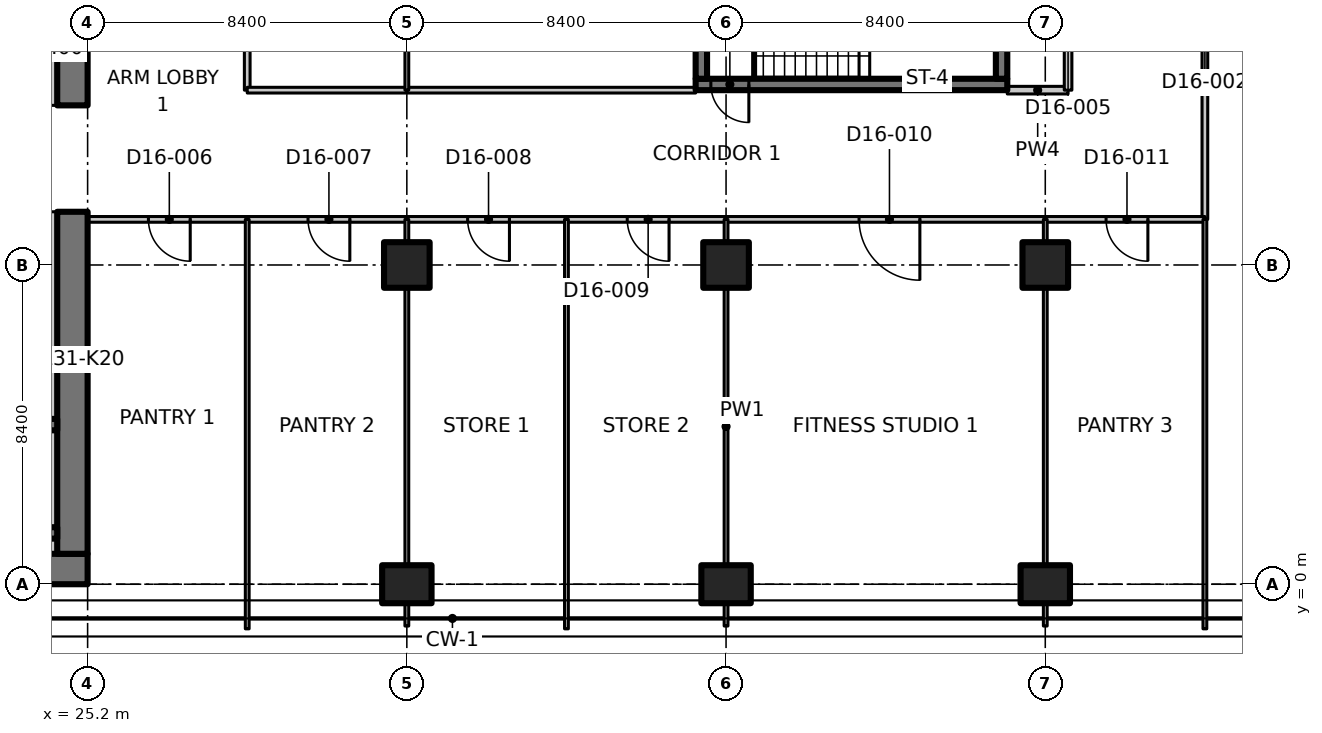
"""IFC4 building model, lengths in metres.
Left out: names, types, materials, properties, quantities, classifications, styles, units other than length and angle.
Written with IfcOpenShell. Run it as: python <this file> out.ifc"""

import sys

from ifc_helpers import new_model, si_unit, direction, frame, frame_2d, origin, origin_2d, place, context, subcontext, project, spatial, polyline, rectangle, outline, extrude, element, fill, save


model = new_model("IFC4")
c1 = context("Model", 3, precision=1e-05, world=origin(), true_north=direction((0.0, 1.0)))
c2 = subcontext(c1, "Body", "Model", "MODEL_VIEW")
j1 = project(units=[si_unit("LENGTHUNIT", "METRE"), si_unit("PLANEANGLEUNIT", "RADIAN")], contexts=[c1])
p1 = place(None, origin())
s1 = spatial("IfcSite", under=j1, at=p1, CompositionType="ELEMENT")
p2 = place(p1, origin())
s2 = spatial("IfcBuilding", under=s1, at=p2, CompositionType="ELEMENT")
p3 = place(p2, frame((0.0, 0.0, 127.7)))
s3 = spatial("IfcBuildingStorey", under=s2, at=p3, CompositionType="ELEMENT", Elevation=127.7)
p4 = place(p3, frame((33.6, 0.0, 0.0), z_axis=(0.0, 0.0, 1.0), x_axis=(0.0, 1.0, 0.0)))
e1 = element("IfcColumn", 1, at=p4, inside=s3, PredefinedType="COLUMN", context=c2, shape_type="SweptSolid", body=[
    extrude(rectangle(XDim=1.0, YDim=1.3, at=origin_2d()), origin(), (0.0, 0.0, 1.0), 3.35),
])
p5 = place(p3, frame((33.6, 8.4, 0.0), z_axis=(0.0, 0.0, 1.0), x_axis=(1.0, 0.0, 0.0)))
e2 = element("IfcColumn", 2, at=p5, inside=s3, PredefinedType="COLUMN", context=c2, shape_type="SweptSolid", body=[
    extrude(rectangle(XDim=1.2, YDim=1.2, at=origin_2d()), origin(), (0.0, 0.0, 1.0), 3.35),
])
p6 = place(p3, frame((42.0, 0.0, 0.0), z_axis=(0.0, 0.0, 1.0), x_axis=(0.0, 1.0, 0.0)))
e3 = element("IfcColumn", 3, at=p6, inside=s3, PredefinedType="COLUMN", context=c2, shape_type="SweptSolid", body=[
    extrude(rectangle(XDim=1.0, YDim=1.3, at=origin_2d()), origin(), (0.0, 0.0, 1.0), 3.35),
])
p7 = place(p3, frame((42.0, 8.4, 0.0), z_axis=(0.0, 0.0, 1.0), x_axis=(1.0, 0.0, 0.0)))
e4 = element("IfcColumn", 4, at=p7, inside=s3, PredefinedType="COLUMN", context=c2, shape_type="SweptSolid", body=[
    extrude(rectangle(XDim=1.2, YDim=1.2, at=origin_2d()), origin(), (0.0, 0.0, 1.0), 3.35),
])
p8 = place(p3, frame((50.4, 0.0, 0.0), z_axis=(0.0, 0.0, 1.0), x_axis=(0.0, 1.0, 0.0)))
e5 = element("IfcColumn", 5, at=p8, inside=s3, PredefinedType="COLUMN", context=c2, shape_type="SweptSolid", body=[
    extrude(rectangle(XDim=1.0, YDim=1.3, at=origin_2d()), origin(), (0.0, 0.0, 1.0), 3.35),
])
p9 = place(p3, frame((50.4, 8.4, 0.0), z_axis=(0.0, 0.0, 1.0), x_axis=(1.0, 0.0, 0.0)))
e6 = element("IfcColumn", 6, at=p9, inside=s3, PredefinedType="COLUMN", context=c2, shape_type="SweptSolid", body=[
    extrude(rectangle(XDim=1.2, YDim=1.2, at=origin_2d()), origin(), (0.0, 0.0, 1.0), 3.35),
])
p10 = place(p3, frame((7.136, 0.4, 0.0), z_axis=(0.0, 0.0, 1.0), x_axis=(1.0, 0.0, 0.0)))
e7 = element("IfcWall", 7, at=p10, inside=s3, PredefinedType="SHEAR", context=c2, shape_type="SweptSolid", body=[
    extrude(rectangle(XDim=18.063, YDim=0.8, at=frame_2d((9.032, 0.0))), origin(), (0.0, 0.0, 1.0), 3.35),
])
p11 = place(p3, frame((24.8, 0.8, 0.0), z_axis=(0.0, 0.0, 1.0), x_axis=(0.0, 1.0, 0.0)))
e8 = element("IfcWall", 8, at=p11, inside=s3, PredefinedType="SHEAR", context=c2, shape_type="SweptSolid", body=[
    extrude(rectangle(XDim=9.0, YDim=0.8, at=frame_2d((4.5, 0.0))), origin(), (0.0, 0.0, 1.0), 3.35),
])
p12 = place(p3, frame((24.8, 12.6, 0.0), z_axis=(0.0, 0.0, 1.0), x_axis=(0.0, 1.0, 0.0)))
e9 = element("IfcWall", 9, at=p12, inside=s3, PredefinedType="SHEAR", context=c2, shape_type="SweptSolid", body=[
    extrude(rectangle(XDim=3.4, YDim=0.8, at=frame_2d((1.7, 0.0))), origin(), (0.0, 0.0, 1.0), 3.35),
])
p13 = place(p3, frame((24.2, 12.6, 0.0), z_axis=(0.0, 0.0, 1.0), x_axis=(0.0, 1.0, 0.0)))
e10 = element("IfcWall", 10, at=p13, inside=s3, PredefinedType="PARTITIONING", context=c2, shape_type="SweptSolid", body=[
    extrude(rectangle(XDim=3.0, YDim=0.4, at=frame_2d((1.5, 0.0))), origin(), (0.0, 0.0, 1.0), 3.35),
])
p14 = place(p3, frame((15.8, 1.35, 0.0), z_axis=(0.0, 0.0, 1.0), x_axis=(1.0, 0.0, 0.0)))
e11 = element("IfcWall", 11, at=p14, inside=s3, PredefinedType="SHEAR", context=c2, shape_type="SweptSolid", body=[
    extrude(rectangle(XDim=8.6, YDim=0.3, at=frame_2d((4.3, 0.0))), origin(), (0.0, 0.0, 1.0), 3.35),
])
p15 = place(p3, frame((15.8, 4.2, 0.0), z_axis=(0.0, 0.0, 1.0), x_axis=(1.0, 0.0, 0.0)))
e12 = element("IfcWall", 12, at=p15, inside=s3, PredefinedType="SHEAR", context=c2, shape_type="SweptSolid", body=[
    extrude(rectangle(XDim=8.6, YDim=0.3, at=frame_2d((4.3, 0.0))), origin(), (0.0, 0.0, 1.0), 3.35),
])
p16 = place(p15, frame((0.4, 0.0, 0.0)))
e13 = element("IfcOpeningElement", 13, at=p16, cuts=e12, PredefinedType="OPENING", context=c2, shape_type="SweptSolid", body=[
    extrude(rectangle(XDim=1.0, YDim=2.1, at=frame_2d((0.5, 1.05))), frame((0.0, 0.16, 0.0), z_axis=(0.0, -1.0, 0.0), x_axis=(1.0, 0.0, 0.0)), (0.0, 0.0, 1.0), 0.32),
])
p17 = place(p3, frame((49.4, 13.15, 0.0), z_axis=(0.0, 0.0, 1.0), x_axis=(-1.0, 0.0, 0.0)))
e14 = element("IfcWall", 14, at=p17, inside=s3, PredefinedType="SHEAR", context=c2, shape_type="SweptSolid", body=[
    extrude(rectangle(XDim=8.2, YDim=0.3, at=frame_2d((4.1, 0.0))), origin(), (0.0, 0.0, 1.0), 3.35),
])
p18 = place(p17, frame((6.8, 0.0, 0.0)))
e15 = element("IfcOpeningElement", 15, at=p18, cuts=e14, PredefinedType="OPENING", context=c2, shape_type="SweptSolid", body=[
    extrude(rectangle(XDim=1.0, YDim=2.1, at=frame_2d((0.5, 1.05))), frame((0.0, 0.16, 0.0), z_axis=(0.0, -1.0, 0.0), x_axis=(1.0, 0.0, 0.0)), (0.0, 0.0, 1.0), 0.32),
])
for number, where, z_axis, x_axis in (
    (16, (41.35, 13.3, 0.0), (0.0, 0.0, 1.0), (0.0, 1.0, 0.0)),
    (17, (49.25, 13.3, 0.0), (0.0, 0.0, 1.0), (0.0, 1.0, 0.0)),
):
    element("IfcWall", number, at=place(p3, frame(where, z_axis=z_axis, x_axis=x_axis)), inside=s3, PredefinedType="SHEAR", context=c2, shape_type="SweptSolid", body=[
        extrude(rectangle(XDim=2.55, YDim=0.3, at=frame_2d((1.275, 0.0))), origin(), (0.0, 0.0, 1.0), 3.35),
    ])
p19 = place(p3, frame((13.35, 1.0, 0.0), z_axis=(0.0, 0.0, 1.0), x_axis=(1.0, 0.0, 0.0)))
e18 = element("IfcWall", 18, at=p19, inside=s3, PredefinedType="PARTITIONING", context=c2, shape_type="SweptSolid", body=[
    extrude(rectangle(XDim=11.05, YDim=0.4, at=frame_2d((5.525, 0.0))), origin(), (0.0, 0.0, 1.0), 3.35),
])
p20 = place(p3, frame((24.2, 1.5, 0.0), z_axis=(0.0, 0.0, 1.0), x_axis=(0.0, 1.0, 0.0)))
e19 = element("IfcWall", 19, at=p20, inside=s3, PredefinedType="PARTITIONING", context=c2, shape_type="SweptSolid", body=[
    extrude(rectangle(XDim=2.55, YDim=0.4, at=frame_2d((1.275, 0.0))), origin(), (0.0, 0.0, 1.0), 3.35),
])
p21 = place(p3, frame((24.2, 4.35, 0.0), z_axis=(0.0, 0.0, 1.0), x_axis=(0.0, 1.0, 0.0)))
e20 = element("IfcWall", 20, at=p21, inside=s3, PredefinedType="PARTITIONING", context=c2, shape_type="SweptSolid", body=[
    extrude(rectangle(XDim=5.45, YDim=0.4, at=frame_2d((2.725, 0.0))), origin(), (0.0, 0.0, 1.0), 3.35),
])
p22 = place(p3, frame((29.4, 17.6, 0.0), z_axis=(0.0, 0.0, 1.0), x_axis=(0.0, -1.0, 0.0)))
e21 = element("IfcWall", 21, at=p22, inside=s3, PredefinedType="PARTITIONING", context=c2, shape_type="SweptSolid", body=[
    extrude(rectangle(XDim=4.6, YDim=0.15, at=frame_2d((2.3, 0.0))), origin(), (0.0, 0.0, 1.0), 3.33),
])
p23 = place(p22, frame((1.8, 0.0, 0.0)))
e22 = element("IfcOpeningElement", 22, at=p23, cuts=e21, PredefinedType="OPENING", context=c2, shape_type="SweptSolid", body=[
    extrude(rectangle(XDim=1.0, YDim=2.1, at=frame_2d((0.5, 1.05))), frame((0.0, 0.085, 0.0), z_axis=(0.0, -1.0, 0.0), x_axis=(1.0, 0.0, 0.0)), (0.0, 0.0, 1.0), 0.17),
])
p24 = place(p3, frame((29.4, 9.6, 0.0), z_axis=(0.0, 0.0, 1.0), x_axis=(-1.0, 0.0, 0.0)))
e23 = element("IfcWall", 23, at=p24, inside=s3, PredefinedType="PARTITIONING", context=c2, shape_type="SweptSolid", body=[
    extrude(rectangle(XDim=4.2, YDim=0.15, at=frame_2d((2.1, 0.0))), origin(), (0.0, 0.0, 1.0), 3.33),
])
p25 = place(p24, frame((1.5, 0.0, 0.0)))
e24 = element("IfcOpeningElement", 24, at=p25, cuts=e23, PredefinedType="OPENING", context=c2, shape_type="SweptSolid", body=[
    extrude(rectangle(XDim=1.1, YDim=2.1, at=frame_2d((0.55, 1.05))), frame((0.0, 0.085, 0.0), z_axis=(0.0, -1.0, 0.0), x_axis=(1.0, 0.0, 0.0)), (0.0, 0.0, 1.0), 0.17),
])
p26 = place(p3, frame((54.6, 13.0, 0.0), z_axis=(0.0, 0.0, 1.0), x_axis=(0.0, -1.0, 0.0)))
e25 = element("IfcWall", 25, at=p26, inside=s3, PredefinedType="PARTITIONING", context=c2, shape_type="SweptSolid", body=[
    extrude(rectangle(XDim=3.4, YDim=0.15, at=frame_2d((1.7, 0.0))), origin(), (0.0, 0.0, 1.0), 3.33),
])
p27 = place(p3, frame((29.4, 13.0, 0.0), z_axis=(0.0, 0.0, 1.0), x_axis=(1.0, 0.0, 0.0)))
e26 = element("IfcWall", 26, at=p27, inside=s3, PredefinedType="PARTITIONING", context=c2, shape_type="SweptSolid", body=[
    extrude(rectangle(XDim=4.2, YDim=0.15, at=frame_2d((2.1, 0.0))), origin(), (0.0, 0.0, 1.0), 3.33),
])
p28 = place(p3, frame((33.6, 13.0, 0.0), z_axis=(0.0, 0.0, 1.0), x_axis=(1.0, 0.0, 0.0)))
e27 = element("IfcWall", 27, at=p28, inside=s3, PredefinedType="PARTITIONING", context=c2, shape_type="SweptSolid", body=[
    extrude(rectangle(XDim=7.6, YDim=0.15, at=frame_2d((3.8, 0.0))), origin(), (0.0, 0.0, 1.0), 3.33),
])
p29 = place(p3, frame((49.4, 13.0, 0.0), z_axis=(0.0, 0.0, 1.0), x_axis=(1.0, 0.0, 0.0)))
e28 = element("IfcWall", 28, at=p29, inside=s3, PredefinedType="PARTITIONING", context=c2, shape_type="SweptSolid", body=[
    extrude(rectangle(XDim=1.6, YDim=0.2, at=frame_2d((0.8, 0.0))), origin(), (0.0, 0.0, 1.0), 3.33),
])
p30 = place(p3, frame((33.6, 9.6, 0.0), z_axis=(0.0, 0.0, 1.0), x_axis=(-1.0, 0.0, 0.0)))
e29 = element("IfcWall", 29, at=p30, inside=s3, PredefinedType="PARTITIONING", context=c2, shape_type="SweptSolid", body=[
    extrude(rectangle(XDim=4.2, YDim=0.15, at=frame_2d((2.1, 0.0))), origin(), (0.0, 0.0, 1.0), 3.33),
])
p31 = place(p30, frame((1.5, 0.0, 0.0)))
e30 = element("IfcOpeningElement", 30, at=p31, cuts=e29, PredefinedType="OPENING", context=c2, shape_type="SweptSolid", body=[
    extrude(rectangle(XDim=1.1, YDim=2.1, at=frame_2d((0.55, 1.05))), frame((0.0, 0.085, 0.0), z_axis=(0.0, -1.0, 0.0), x_axis=(1.0, 0.0, 0.0)), (0.0, 0.0, 1.0), 0.17),
])
p32 = place(p3, frame((37.8, 9.6, 0.0), z_axis=(0.0, 0.0, 1.0), x_axis=(-1.0, 0.0, 0.0)))
e31 = element("IfcWall", 31, at=p32, inside=s3, PredefinedType="PARTITIONING", context=c2, shape_type="SweptSolid", body=[
    extrude(rectangle(XDim=4.2, YDim=0.15, at=frame_2d((2.1, 0.0))), origin(), (0.0, 0.0, 1.0), 3.33),
])
p33 = place(p32, frame((1.5, 0.0, 0.0)))
e32 = element("IfcOpeningElement", 32, at=p33, cuts=e31, PredefinedType="OPENING", context=c2, shape_type="SweptSolid", body=[
    extrude(rectangle(XDim=1.1, YDim=2.1, at=frame_2d((0.55, 1.05))), frame((0.0, 0.085, 0.0), z_axis=(0.0, -1.0, 0.0), x_axis=(1.0, 0.0, 0.0)), (0.0, 0.0, 1.0), 0.17),
])
p34 = place(p3, frame((42.0, 9.6, 0.0), z_axis=(0.0, 0.0, 1.0), x_axis=(-1.0, 0.0, 0.0)))
e33 = element("IfcWall", 33, at=p34, inside=s3, PredefinedType="PARTITIONING", context=c2, shape_type="SweptSolid", body=[
    extrude(rectangle(XDim=4.2, YDim=0.15, at=frame_2d((2.1, 0.0))), origin(), (0.0, 0.0, 1.0), 3.33),
])
p35 = place(p34, frame((1.5, 0.0, 0.0)))
e34 = element("IfcOpeningElement", 34, at=p35, cuts=e33, PredefinedType="OPENING", context=c2, shape_type="SweptSolid", body=[
    extrude(rectangle(XDim=1.1, YDim=2.1, at=frame_2d((0.55, 1.05))), frame((0.0, 0.085, 0.0), z_axis=(0.0, -1.0, 0.0), x_axis=(1.0, 0.0, 0.0)), (0.0, 0.0, 1.0), 0.17),
])
p36 = place(p3, frame((50.4, 9.6, 0.0), z_axis=(0.0, 0.0, 1.0), x_axis=(-1.0, 0.0, 0.0)))
e35 = element("IfcWall", 35, at=p36, inside=s3, PredefinedType="PARTITIONING", context=c2, shape_type="SweptSolid", body=[
    extrude(rectangle(XDim=8.4, YDim=0.15, at=frame_2d((4.2, 0.0))), origin(), (0.0, 0.0, 1.0), 3.33),
])
p37 = place(p36, frame((3.3, 0.0, 0.0)))
e36 = element("IfcOpeningElement", 36, at=p37, cuts=e35, PredefinedType="OPENING", context=c2, shape_type="SweptSolid", body=[
    extrude(rectangle(XDim=1.6, YDim=2.1, at=frame_2d((0.8, 1.05))), frame((0.0, 0.085, 0.0), z_axis=(0.0, -1.0, 0.0), x_axis=(1.0, 0.0, 0.0)), (0.0, 0.0, 1.0), 0.17),
])
p38 = place(p3, frame((54.6, 9.6, 0.0), z_axis=(0.0, 0.0, 1.0), x_axis=(-1.0, 0.0, 0.0)))
e37 = element("IfcWall", 37, at=p38, inside=s3, PredefinedType="PARTITIONING", context=c2, shape_type="SweptSolid", body=[
    extrude(rectangle(XDim=4.2, YDim=0.15, at=frame_2d((2.1, 0.0))), origin(), (0.0, 0.0, 1.0), 3.33),
])
p39 = place(p38, frame((1.5, 0.0, 0.0)))
e38 = element("IfcOpeningElement", 38, at=p39, cuts=e37, PredefinedType="OPENING", context=c2, shape_type="SweptSolid", body=[
    extrude(rectangle(XDim=1.1, YDim=2.1, at=frame_2d((0.55, 1.05))), frame((0.0, 0.085, 0.0), z_axis=(0.0, -1.0, 0.0), x_axis=(1.0, 0.0, 0.0)), (0.0, 0.0, 1.0), 0.17),
])
p40 = place(p3, frame((54.6, 21.2, 0.0), z_axis=(0.0, 0.0, 1.0), x_axis=(0.0, -1.0, 0.0)))
e39 = element("IfcWall", 39, at=p40, inside=s3, PredefinedType="PARTITIONING", context=c2, shape_type="SweptSolid", body=[
    extrude(rectangle(XDim=8.2, YDim=0.15, at=frame_2d((4.1, 0.0))), origin(), (0.0, 0.0, 1.0), 3.33),
])
p41 = place(p40, frame((3.2, 0.0, 0.0)))
e40 = element("IfcOpeningElement", 40, at=p41, cuts=e39, PredefinedType="OPENING", context=c2, shape_type="SweptSolid", body=[
    extrude(rectangle(XDim=2.0, YDim=2.4, at=frame_2d((1.0, 1.2))), frame((0.0, 0.085, 0.0), z_axis=(0.0, -1.0, 0.0), x_axis=(1.0, 0.0, 0.0)), (0.0, 0.0, 1.0), 0.17),
])
p42 = place(p3, frame((54.6, -1.174, 0.0), z_axis=(0.0, 0.0, 1.0), x_axis=(0.0, 1.0, 0.0)))
e41 = element("IfcWall", 41, at=p42, inside=s3, PredefinedType="PARTITIONING", context=c2, shape_type="SweptSolid", body=[
    extrude(outline(polyline([(0.0, 0.0), (10.774, 0.0), (10.774, 3.33), (1.624, 3.33), (1.622, 2.98), (0.726, 2.98), (0.724, 3.33), (0.074, 3.33), (0.0, 3.33), (0.0, 0.0)])), frame((0.0, 0.05, 0.0), z_axis=(0.0, -1.0, 0.0), x_axis=(1.0, 0.0, 0.0)), (0.0, 0.0, 1.0), 0.1),
])
p43 = place(p3, frame((51.0, 13.0, 0.0), z_axis=(0.0, 0.0, 1.0), x_axis=(0.0, 1.0, 0.0)))
e42 = element("IfcWall", 42, at=p43, inside=s3, PredefinedType="PARTITIONING", context=c2, shape_type="SweptSolid", body=[
    extrude(rectangle(XDim=3.18, YDim=0.2, at=frame_2d((1.59, 0.0))), origin(), (0.0, 0.0, 1.0), 3.33),
])
p44 = place(p43, frame((1.2, 0.0, 0.0)))
e43 = element("IfcOpeningElement", 43, at=p44, cuts=e42, PredefinedType="OPENING", context=c2, shape_type="SweptSolid", body=[
    extrude(rectangle(XDim=1.0, YDim=2.1, at=frame_2d((0.5, 1.05))), frame((0.0, 0.11, 0.0), z_axis=(0.0, -1.0, 0.0), x_axis=(1.0, 0.0, 0.0)), (0.0, 0.0, 1.0), 0.22),
])
p45 = place(p3, frame((33.6, 16.18, 0.0), z_axis=(0.0, 0.0, 1.0), x_axis=(0.0, -1.0, 0.0)))
e44 = element("IfcWall", 44, at=p45, inside=s3, PredefinedType="PARTITIONING", context=c2, shape_type="SweptSolid", body=[
    extrude(rectangle(XDim=3.18, YDim=0.1, at=frame_2d((1.59, 0.0))), origin(), (0.0, 0.0, 1.0), 3.33),
])
p46 = place(p3, frame((29.4, 9.6, 0.0), z_axis=(0.0, 0.0, 1.0), x_axis=(0.0, -1.0, 0.0)))
e45 = element("IfcWall", 45, at=p46, inside=s3, PredefinedType="PARTITIONING", context=c2, shape_type="SweptSolid", body=[
    extrude(outline(polyline([(0.0, 0.0), (10.774, 0.0), (10.774, 3.33), (10.7, 3.33), (10.05, 3.33), (10.048, 2.98), (9.152, 2.98), (9.15, 3.33), (0.0, 3.33), (0.0, 0.0)])), frame((0.0, 0.05, 0.0), z_axis=(0.0, -1.0, 0.0), x_axis=(1.0, 0.0, 0.0)), (0.0, 0.0, 1.0), 0.1),
])
p47 = place(p3, frame((33.6, 9.6, 0.0), z_axis=(0.0, 0.0, 1.0), x_axis=(0.0, -1.0, 0.0)))
e46 = element("IfcWall", 46, at=p47, inside=s3, PredefinedType="PARTITIONING", context=c2, shape_type="SweptSolid", body=[
    extrude(rectangle(XDim=0.58, YDim=0.1, at=frame_2d((0.29, 0.0))), origin(), (0.0, 0.0, 1.0), 3.33),
])
p48 = place(p3, frame((33.6, 7.78, 0.0), z_axis=(0.0, 0.0, 1.0), x_axis=(0.0, -1.0, 0.0)))
e47 = element("IfcWall", 47, at=p48, inside=s3, PredefinedType="PARTITIONING", context=c2, shape_type="SweptSolid", body=[
    extrude(rectangle(XDim=7.26, YDim=0.1, at=frame_2d((3.63, 0.0))), origin(), (0.0, 0.0, 1.0), 3.33),
])
p49 = place(p3, frame((33.6, -0.52, 0.0), z_axis=(0.0, 0.0, 1.0), x_axis=(0.0, -1.0, 0.0)))
e48 = element("IfcWall", 48, at=p49, inside=s3, PredefinedType="PARTITIONING", context=c2, shape_type="SweptSolid", body=[
    extrude(rectangle(XDim=0.58, YDim=0.1, at=frame_2d((0.29, 0.0))), origin(), (0.0, 0.0, 1.0), 3.33),
])
p50 = place(p3, frame((37.8, 9.6, 0.0), z_axis=(0.0, 0.0, 1.0), x_axis=(0.0, -1.0, 0.0)))
e49 = element("IfcWall", 49, at=p50, inside=s3, PredefinedType="PARTITIONING", context=c2, shape_type="SweptSolid", body=[
    extrude(outline(polyline([(0.0, 0.0), (10.774, 0.0), (10.774, 3.33), (10.7, 3.33), (10.05, 3.33), (10.048, 2.98), (9.152, 2.98), (9.15, 3.33), (0.0, 3.33), (0.0, 0.0)])), frame((0.0, 0.05, 0.0), z_axis=(0.0, -1.0, 0.0), x_axis=(1.0, 0.0, 0.0)), (0.0, 0.0, 1.0), 0.1),
])
p51 = place(p3, frame((42.0, 9.6, 0.0), z_axis=(0.0, 0.0, 1.0), x_axis=(0.0, -1.0, 0.0)))
e50 = element("IfcWall", 50, at=p51, inside=s3, PredefinedType="PARTITIONING", context=c2, shape_type="SweptSolid", body=[
    extrude(rectangle(XDim=0.58, YDim=0.1, at=frame_2d((0.29, 0.0))), origin(), (0.0, 0.0, 1.0), 3.33),
])
p52 = place(p3, frame((42.0, 7.78, 0.0), z_axis=(0.0, 0.0, 1.0), x_axis=(0.0, -1.0, 0.0)))
e51 = element("IfcWall", 51, at=p52, inside=s3, PredefinedType="PARTITIONING", context=c2, shape_type="SweptSolid", body=[
    extrude(rectangle(XDim=7.26, YDim=0.1, at=frame_2d((3.63, 0.0))), origin(), (0.0, 0.0, 1.0), 3.33),
])
for number, where, z_axis, x_axis in (
    (52, (42.0, -0.52, 0.0), (0.0, 0.0, 1.0), (0.0, -1.0, 0.0)),
    (53, (50.4, 9.6, 0.0), (0.0, 0.0, 1.0), (0.0, -1.0, 0.0)),
):
    element("IfcWall", number, at=place(p3, frame(where, z_axis=z_axis, x_axis=x_axis)), inside=s3, PredefinedType="PARTITIONING", context=c2, shape_type="SweptSolid", body=[
        extrude(rectangle(XDim=0.58, YDim=0.1, at=frame_2d((0.29, 0.0))), origin(), (0.0, 0.0, 1.0), 3.33),
    ])
p53 = place(p3, frame((50.4, 7.78, 0.0), z_axis=(0.0, 0.0, 1.0), x_axis=(0.0, -1.0, 0.0)))
e54 = element("IfcWall", 54, at=p53, inside=s3, PredefinedType="PARTITIONING", context=c2, shape_type="SweptSolid", body=[
    extrude(rectangle(XDim=7.26, YDim=0.1, at=frame_2d((3.63, 0.0))), origin(), (0.0, 0.0, 1.0), 3.33),
])
p54 = place(p3, frame((50.4, -0.52, 0.0), z_axis=(0.0, 0.0, 1.0), x_axis=(0.0, -1.0, 0.0)))
e55 = element("IfcWall", 55, at=p54, inside=s3, PredefinedType="PARTITIONING", context=c2, shape_type="SweptSolid", body=[
    extrude(rectangle(XDim=0.58, YDim=0.1, at=frame_2d((0.29, 0.0))), origin(), (0.0, 0.0, 1.0), 3.33),
])
p55 = place(p18, origin())
e56 = element("IfcDoor", 56, at=p55, inside=s3, OperationType="SINGLE_SWING_RIGHT", PredefinedType="DOOR", context=c2, shape_type="SweptSolid", body=[
    extrude(rectangle(XDim=1.0, YDim=2.1, at=frame_2d((0.5, 1.05))), frame((0.0, 0.025, 0.0), z_axis=(0.0, -1.0, 0.0), x_axis=(1.0, 0.0, 0.0)), (0.0, 0.0, 1.0), 0.05),
])
fill(e15, e56)
p56 = place(p25, origin())
e57 = element("IfcDoor", 57, at=p56, inside=s3, OperationType="SINGLE_SWING_LEFT", PredefinedType="DOOR", context=c2, shape_type="SweptSolid", body=[
    extrude(rectangle(XDim=1.1, YDim=2.1, at=frame_2d((0.55, 1.05))), frame((0.0, 0.025, 0.0), z_axis=(0.0, -1.0, 0.0), x_axis=(1.0, 0.0, 0.0)), (0.0, 0.0, 1.0), 0.05),
])
fill(e24, e57)
p57 = place(p31, origin())
e58 = element("IfcDoor", 58, at=p57, inside=s3, OperationType="SINGLE_SWING_LEFT", PredefinedType="DOOR", context=c2, shape_type="SweptSolid", body=[
    extrude(rectangle(XDim=1.1, YDim=2.1, at=frame_2d((0.55, 1.05))), frame((0.0, 0.025, 0.0), z_axis=(0.0, -1.0, 0.0), x_axis=(1.0, 0.0, 0.0)), (0.0, 0.0, 1.0), 0.05),
])
fill(e30, e58)
p58 = place(p33, origin())
e59 = element("IfcDoor", 59, at=p58, inside=s3, OperationType="SINGLE_SWING_LEFT", PredefinedType="DOOR", context=c2, shape_type="SweptSolid", body=[
    extrude(rectangle(XDim=1.1, YDim=2.1, at=frame_2d((0.55, 1.05))), frame((0.0, 0.025, 0.0), z_axis=(0.0, -1.0, 0.0), x_axis=(1.0, 0.0, 0.0)), (0.0, 0.0, 1.0), 0.05),
])
fill(e32, e59)
p59 = place(p35, origin())
e60 = element("IfcDoor", 60, at=p59, inside=s3, OperationType="SINGLE_SWING_LEFT", PredefinedType="DOOR", context=c2, shape_type="SweptSolid", body=[
    extrude(rectangle(XDim=1.1, YDim=2.1, at=frame_2d((0.55, 1.05))), frame((0.0, 0.025, 0.0), z_axis=(0.0, -1.0, 0.0), x_axis=(1.0, 0.0, 0.0)), (0.0, 0.0, 1.0), 0.05),
])
fill(e34, e60)
p60 = place(p37, origin())
e61 = element("IfcDoor", 61, at=p60, inside=s3, OperationType="DOUBLE_DOOR_SINGLE_SWING", PredefinedType="DOOR", context=c2, shape_type="SweptSolid", body=[
    extrude(rectangle(XDim=1.6, YDim=2.1, at=frame_2d((0.8, 1.05))), frame((0.0, 0.025, 0.0), z_axis=(0.0, -1.0, 0.0), x_axis=(1.0, 0.0, 0.0)), (0.0, 0.0, 1.0), 0.05),
])
fill(e36, e61)
p61 = place(p39, origin())
e62 = element("IfcDoor", 62, at=p61, inside=s3, OperationType="SINGLE_SWING_LEFT", PredefinedType="DOOR", context=c2, shape_type="SweptSolid", body=[
    extrude(rectangle(XDim=1.1, YDim=2.1, at=frame_2d((0.55, 1.05))), frame((0.0, 0.025, 0.0), z_axis=(0.0, -1.0, 0.0), x_axis=(1.0, 0.0, 0.0)), (0.0, 0.0, 1.0), 0.05),
])
fill(e38, e62)
save(model, sys.argv[1])
